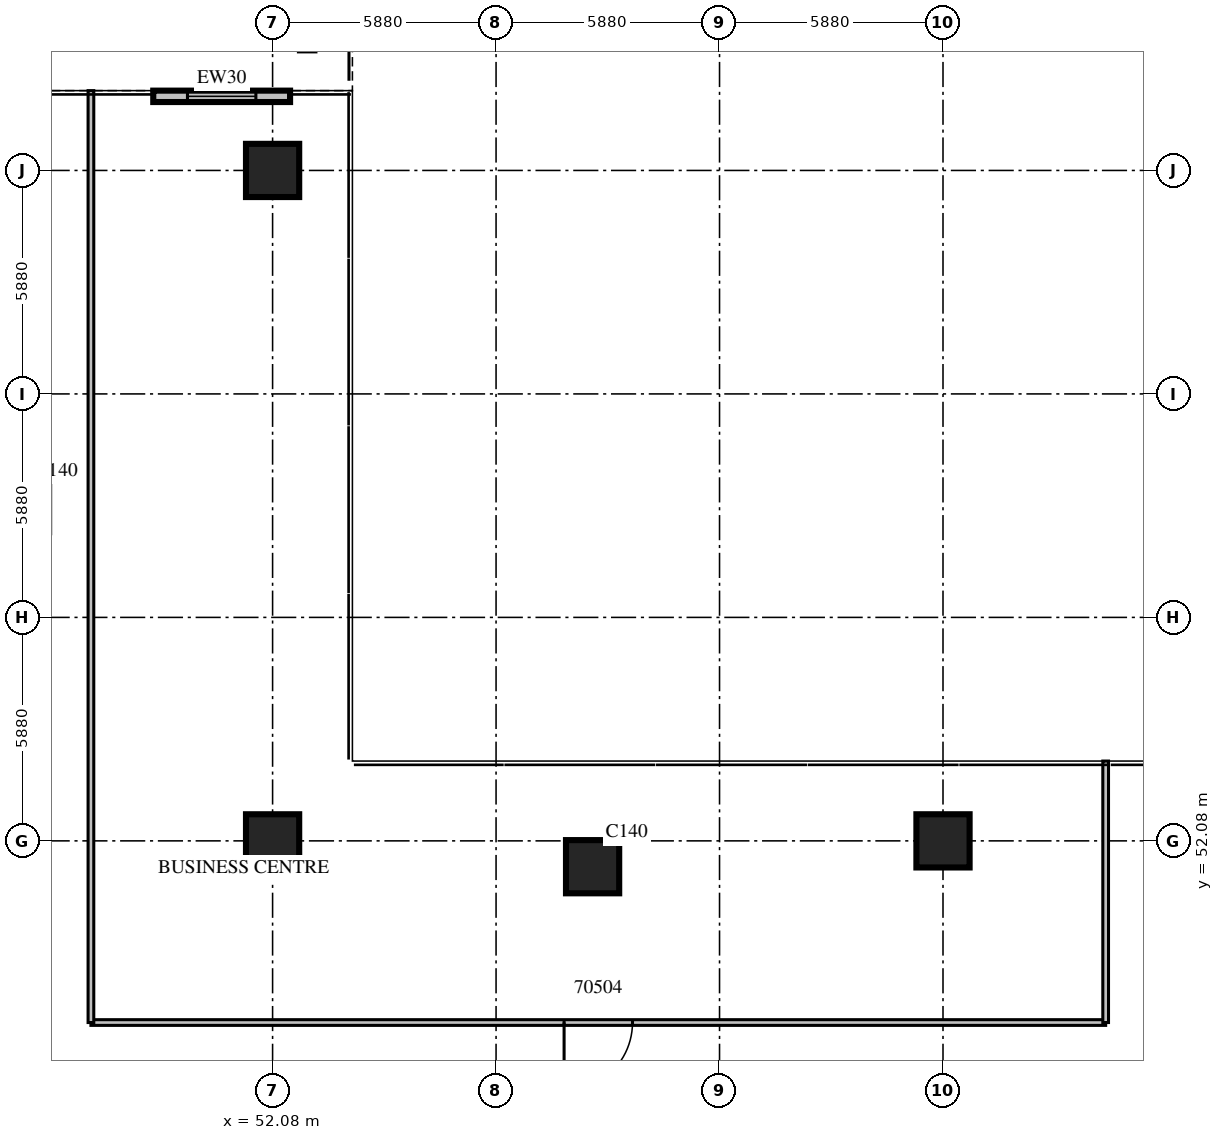
"""IFC4 building model, lengths in metres.
Left out: names, types, materials, properties, quantities, classifications, styles, units other than length and angle.
Written with IfcOpenShell. Run it as: python <this file> out.ifc"""

import sys

from ifc_helpers import new_model, si_unit, direction, frame, frame_2d, origin, origin_2d, place, context, subcontext, project, spatial, rectangle, extrude, source, transform, mapped, element, fill, save


model = new_model("IFC4")
c1 = context("Model", 3, precision=1e-05, world=origin(), true_north=direction((0.0, 1.0)))
c2 = subcontext(c1, "Body", "Model", "MODEL_VIEW")
j1 = project(units=[si_unit("LENGTHUNIT", "METRE"), si_unit("PLANEANGLEUNIT", "RADIAN")], contexts=[c1])
p1 = place(None, origin())
s1 = spatial("IfcSite", under=j1, at=p1, CompositionType="ELEMENT")
p2 = place(p1, origin())
s2 = spatial("IfcBuilding", under=s1, at=p2, CompositionType="ELEMENT")
p3 = place(p2, frame((0.0, 0.0, 12.9)))
s3 = spatial("IfcBuildingStorey", under=s2, at=p3, CompositionType="ELEMENT", Elevation=12.9)
m1 = source(origin(), c2, "Body", "SweptSolid", [
    extrude(rectangle(XDim=1.4, YDim=1.4, at=origin_2d()), origin(), (0.0, 0.0, 1.0), 5.4),
])
for number, where, z_axis, x_axis in (
    (1, (52.08, 52.08, 0.0), (0.0, 0.0, 1.0), (1.0, 0.0, 0.0)),
    (2, (52.08, 69.72, 0.0), (0.0, 0.0, 1.0), (1.0, 0.0, 0.0)),
    (3, (60.5, 51.4, 0.0), (0.0, 0.0, 1.0), (1.0, 0.0, 0.0)),
    (4, (69.72, 52.08, 0.0), (0.0, 0.0, 1.0), (1.0, 0.0, 0.0)),
):
    element("IfcColumn", number, at=place(p3, frame(where, z_axis=z_axis, x_axis=x_axis)), inside=s3, PredefinedType="COLUMN", context=c2, shape_type="MappedRepresentation", body=[
        mapped(m1, transform((0.0, 0.0, 0.0), scale=1.0)),
    ])
p4 = place(p3, frame((52.54, 71.67, 0.0), z_axis=(0.0, 0.0, 1.0), x_axis=(-1.0, 0.0, 0.0)))
e5 = element("IfcWall", 5, at=p4, inside=s3, PredefinedType="STANDARD", context=c2, shape_type="SweptSolid", body=[
    extrude(rectangle(XDim=3.6, YDim=0.3, at=frame_2d((1.8, 0.0))), origin(), (0.0, 0.0, 1.0), 4.8),
])
m2 = source(origin(), c2, "Body", "SweptSolid", [
    extrude(rectangle(XDim=1.8, YDim=2.4, at=frame_2d((0.9, 1.2))), frame((0.0, 0.16, 0.0), z_axis=(0.0, -1.0, 0.0), x_axis=(1.0, 0.0, 0.0)), (0.0, 0.0, 1.0), 0.32),
])
p5 = place(p4, frame((0.9, 0.0, 0.0)))
e6 = element("IfcOpeningElement", 6, at=p5, cuts=e5, PredefinedType="OPENING", context=c2, shape_type="MappedRepresentation", body=[
    mapped(m2, transform((0.0, 0.0, 0.0), scale=1.0)),
])
m3 = source(origin(), c2, "Body", "SweptSolid", [
    extrude(rectangle(XDim=26.7, YDim=0.15, at=frame_2d((13.35, 0.0))), origin(), (0.0, 0.0, 1.0), 4.8),
])
p6 = place(p3, frame((47.3, 47.3, 0.0), z_axis=(0.0, 0.0, 1.0), x_axis=(1.0, 0.0, 0.0)))
e7 = element("IfcWall", 7, at=p6, inside=s3, PredefinedType="PARTITIONING", context=c2, shape_type="MappedRepresentation", body=[
    mapped(m3, transform((0.0, 0.0, 0.0), scale=1.0)),
])
m4 = source(origin(), c2, "Body", "SweptSolid", [
    extrude(rectangle(XDim=1.8, YDim=2.1, at=frame_2d((0.9, 1.05))), frame((0.0, 0.085, 0.0), z_axis=(0.0, -1.0, 0.0), x_axis=(1.0, 0.0, 0.0)), (0.0, 0.0, 1.0), 0.17),
])
p7 = place(p6, frame((12.45, 0.0, 0.0)))
e8 = element("IfcOpeningElement", 8, at=p7, cuts=e7, PredefinedType="OPENING", context=c2, shape_type="MappedRepresentation", body=[
    mapped(m4, transform((0.0, 0.0, 0.0), scale=1.0)),
])
m5 = source(origin(), c2, "Body", "SweptSolid", [
    extrude(rectangle(XDim=24.52, YDim=0.15, at=frame_2d((12.26, 0.0))), origin(), (0.0, 0.0, 1.0), 4.8),
])
p8 = place(p3, frame((47.3, 47.3, 0.0), z_axis=(0.0, 0.0, 1.0), x_axis=(0.0, 1.0, 0.0)))
e9 = element("IfcWall", 9, at=p8, inside=s3, PredefinedType="PARTITIONING", context=c2, shape_type="MappedRepresentation", body=[
    mapped(m5, transform((0.0, 0.0, 0.0), scale=1.0)),
])
m6 = source(origin(), c2, "Body", "SweptSolid", [
    extrude(rectangle(XDim=6.88, YDim=0.15, at=frame_2d((3.44, 0.0))), origin(), (0.0, 0.0, 1.0), 4.8),
])
p9 = place(p3, frame((74.0, 47.3, 0.0), z_axis=(0.0, 0.0, 1.0), x_axis=(0.0, 1.0, 0.0)))
e10 = element("IfcWall", 10, at=p9, inside=s3, PredefinedType="PARTITIONING", context=c2, shape_type="MappedRepresentation", body=[
    mapped(m6, transform((0.0, 0.0, 0.0), scale=1.0)),
])
m7 = source(origin(), c2, "Body", "SweptSolid", [
    extrude(rectangle(XDim=1.8, YDim=2.4, at=frame_2d((0.9, 1.2))), frame((0.0, 0.025, 0.0), z_axis=(0.0, -1.0, 0.0), x_axis=(1.0, 0.0, 0.0)), (0.0, 0.0, 1.0), 0.05),
])
p10 = place(p5, origin())
e11 = element("IfcDoor", 11, at=p10, inside=s3, OperationType="SLIDING_TO_LEFT", PredefinedType="DOOR", context=c2, shape_type="MappedRepresentation", body=[
    mapped(m7, transform((0.0, 0.0, 0.0), scale=1.0)),
])
fill(e6, e11)
m8 = source(origin(), c2, "Body", "SweptSolid", [
    extrude(rectangle(XDim=1.8, YDim=2.1, at=frame_2d((0.9, 1.05))), frame((0.0, 0.025, 0.0), z_axis=(0.0, -1.0, 0.0), x_axis=(1.0, 0.0, 0.0)), (0.0, 0.0, 1.0), 0.05),
])
p11 = place(p7, origin())
e12 = element("IfcDoor", 12, at=p11, inside=s3, OperationType="DOUBLE_DOOR_SINGLE_SWING", PredefinedType="DOOR", context=c2, shape_type="MappedRepresentation", body=[
    mapped(m8, transform((0.0, 0.0, 0.0), scale=1.0)),
])
fill(e8, e12)
save(model, sys.argv[1])
